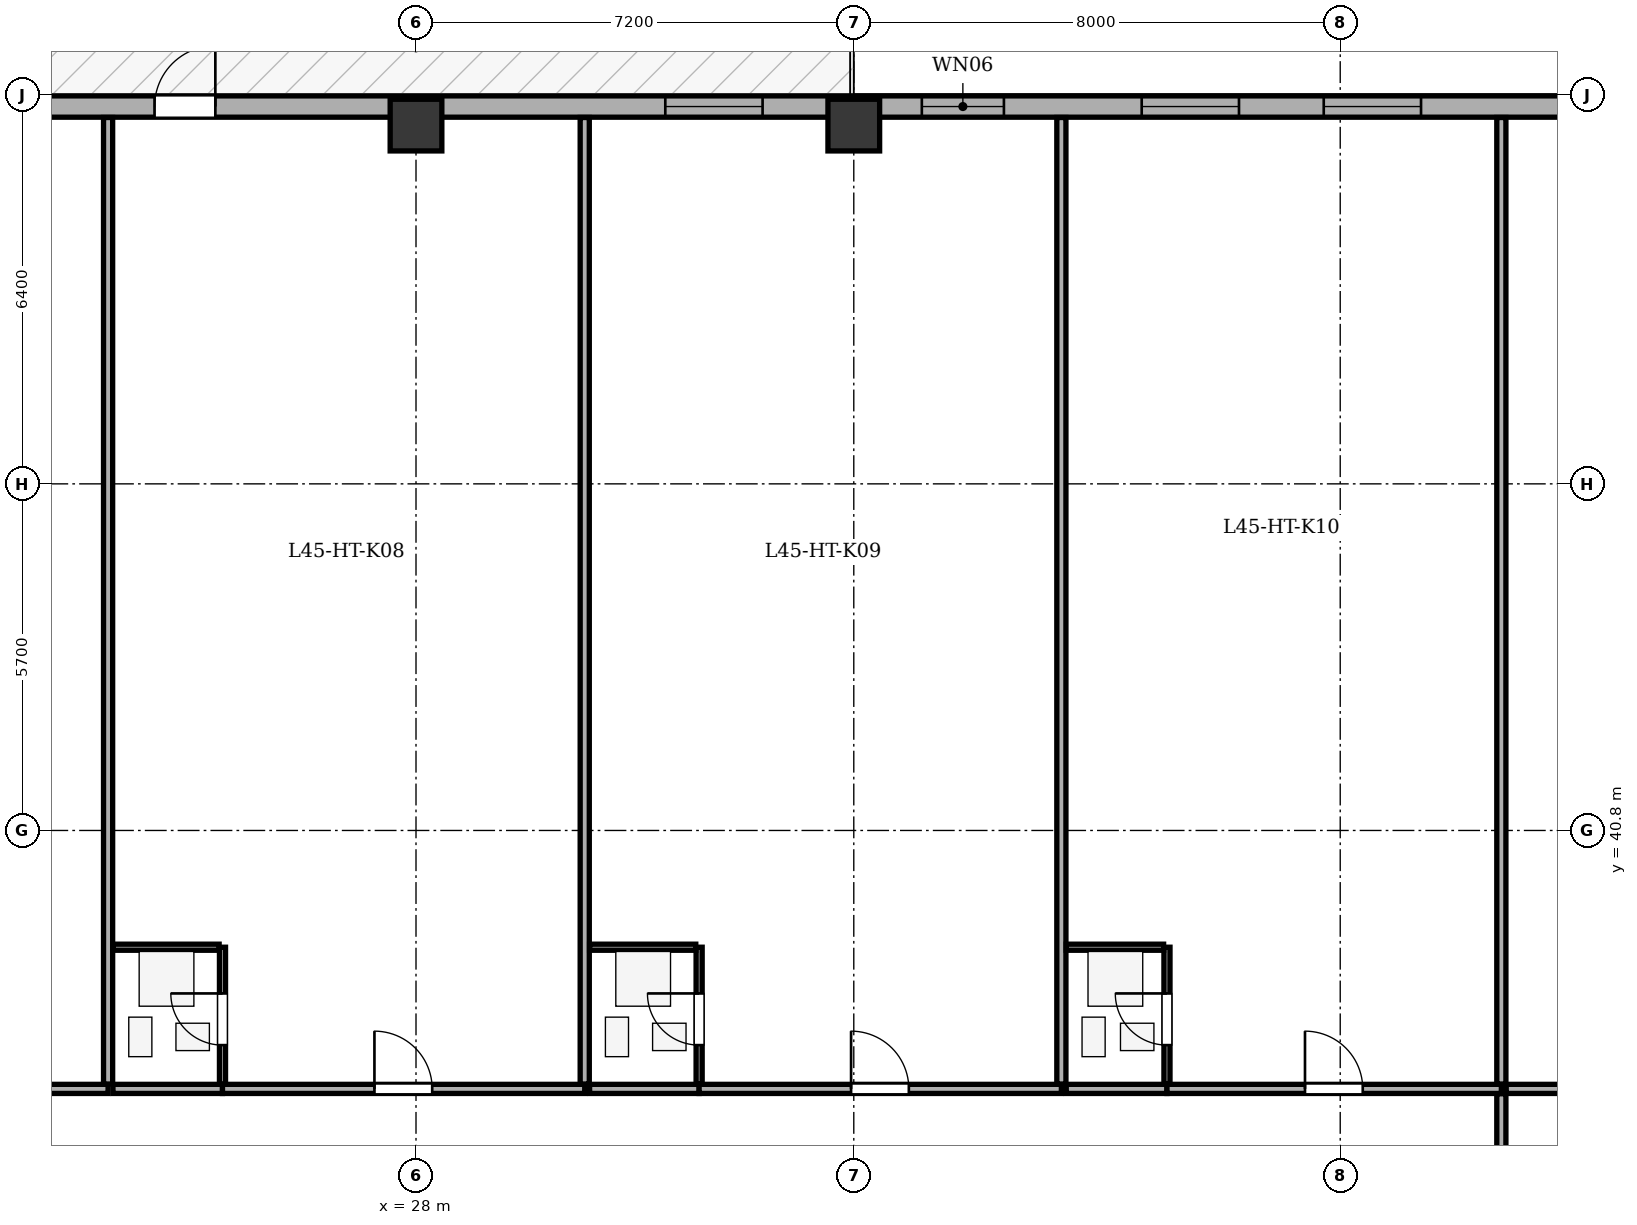
"""IFC4 building model, lengths in metres.
Left out: names, types, materials, properties, quantities, classifications, styles, units other than length and angle.
Written with IfcOpenShell. Run it as: python <this file> out.ifc"""

import sys

from ifc_helpers import new_model, si_unit, direction, frame, frame_2d, origin, origin_2d, place, context, subcontext, project, spatial, rectangle, extrude, element, fill, save


model = new_model("IFC4")
c1 = context("Model", 3, precision=1e-05, world=origin(), true_north=direction((0.0, 1.0)))
c2 = subcontext(c1, "Body", "Model", "MODEL_VIEW")
j1 = project(units=[si_unit("LENGTHUNIT", "METRE"), si_unit("PLANEANGLEUNIT", "RADIAN")], contexts=[c1])
p1 = place(None, origin())
s1 = spatial("IfcSite", under=j1, at=p1, CompositionType="ELEMENT")
p2 = place(p1, origin())
s2 = spatial("IfcBuilding", under=s1, at=p2, CompositionType="ELEMENT")
p3 = place(p2, frame((0.0, 0.0, 176.3)))
s3 = spatial("IfcBuildingStorey", under=s2, at=p3, CompositionType="ELEMENT", Elevation=176.3)
for number, where, z_axis, x_axis in (
    (1, (28.0, 52.4, 0.0), (0.0, 0.0, 1.0), (1.0, 0.0, 0.0)),
    (2, (35.2, 52.4, 0.0), (0.0, 0.0, 1.0), (1.0, 0.0, 0.0)),
):
    element("IfcColumn", number, at=place(p3, frame(where, z_axis=z_axis, x_axis=x_axis)), inside=s3, PredefinedType="COLUMN", context=c2, shape_type="SweptSolid", body=[
        extrude(rectangle(XDim=0.85, YDim=0.85, at=origin_2d()), origin(), (0.0, 0.0, 1.0), 3.5),
    ])
p4 = place(p3, frame((15.7, 52.705, 0.0), z_axis=(0.0, 0.0, 1.0), x_axis=(1.0, 0.0, 0.0)))
e3 = element("IfcWall", 3, at=p4, inside=s3, PredefinedType="STANDARD", context=c2, shape_type="SweptSolid", body=[
    extrude(rectangle(XDim=35.0, YDim=0.35, at=frame_2d((17.5, 0.0))), origin(), (0.0, 0.0, 1.0), 2.785),
])
p5 = place(p4, frame((8.0, 0.0, 0.0)))
e4 = element("IfcOpeningElement", 4, at=p5, cuts=e3, PredefinedType="OPENING", context=c2, shape_type="SweptSolid", body=[
    extrude(rectangle(XDim=1.0, YDim=2.02, at=frame_2d((0.5, 1.01))), frame((0.0, 0.185, 0.0), z_axis=(0.0, -1.0, 0.0), x_axis=(1.0, 0.0, 0.0)), (0.0, 0.0, 1.0), 0.37),
])
p6 = place(p4, frame((1.8, 0.0, 0.75)))
e5 = element("IfcOpeningElement", 5, at=p6, cuts=e3, PredefinedType="OPENING", context=c2, shape_type="SweptSolid", body=[
    extrude(rectangle(XDim=1.6, YDim=1.75, at=frame_2d((0.8, 0.875))), frame((0.0, 0.185, 0.0), z_axis=(0.0, -1.0, 0.0), x_axis=(1.0, 0.0, 0.0)), (0.0, 0.0, 1.0), 0.37),
])
p7 = place(p4, frame((16.4, 0.0, 0.75)))
e6 = element("IfcOpeningElement", 6, at=p7, cuts=e3, PredefinedType="OPENING", context=c2, shape_type="SweptSolid", body=[
    extrude(rectangle(XDim=1.6, YDim=1.75, at=frame_2d((0.8, 0.875))), frame((0.0, 0.185, 0.0), z_axis=(0.0, -1.0, 0.0), x_axis=(1.0, 0.0, 0.0)), (0.0, 0.0, 1.0), 0.37),
])
p8 = place(p4, frame((20.619, 0.0, 0.75)))
e7 = element("IfcOpeningElement", 7, at=p8, cuts=e3, PredefinedType="OPENING", context=c2, shape_type="SweptSolid", body=[
    extrude(rectangle(XDim=1.35, YDim=1.75, at=frame_2d((0.675, 0.875))), frame((0.0, 0.185, 0.0), z_axis=(0.0, -1.0, 0.0), x_axis=(1.0, 0.0, 0.0)), (0.0, 0.0, 1.0), 0.37),
])
p9 = place(p4, frame((24.235, 0.0, 0.75)))
e8 = element("IfcOpeningElement", 8, at=p9, cuts=e3, PredefinedType="OPENING", context=c2, shape_type="SweptSolid", body=[
    extrude(rectangle(XDim=1.6, YDim=1.75, at=frame_2d((0.8, 0.875))), frame((0.0, 0.185, 0.0), z_axis=(0.0, -1.0, 0.0), x_axis=(1.0, 0.0, 0.0)), (0.0, 0.0, 1.0), 0.37),
])
p10 = place(p4, frame((27.229, 0.0, 0.75)))
e9 = element("IfcOpeningElement", 9, at=p10, cuts=e3, PredefinedType="OPENING", context=c2, shape_type="SweptSolid", body=[
    extrude(rectangle(XDim=1.6, YDim=1.75, at=frame_2d((0.8, 0.875))), frame((0.0, 0.185, 0.0), z_axis=(0.0, -1.0, 0.0), x_axis=(1.0, 0.0, 0.0)), (0.0, 0.0, 1.0), 0.37),
])
p11 = place(p4, frame((31.637, 0.0, 0.75)))
e10 = element("IfcOpeningElement", 10, at=p11, cuts=e3, PredefinedType="OPENING", context=c2, shape_type="SweptSolid", body=[
    extrude(rectangle(XDim=1.6, YDim=1.75, at=frame_2d((0.8, 0.875))), frame((0.0, 0.185, 0.0), z_axis=(0.0, -1.0, 0.0), x_axis=(1.0, 0.0, 0.0)), (0.0, 0.0, 1.0), 0.37),
])
p12 = place(p3, frame((17.437, 36.55, 0.0), z_axis=(0.0, 0.0, 1.0), x_axis=(1.0, 0.0, 0.0)))
e11 = element("IfcWall", 11, at=p12, inside=s3, PredefinedType="PARTITIONING", context=c2, shape_type="SweptSolid", body=[
    extrude(rectangle(XDim=5.5, YDim=0.15, at=frame_2d((2.75, 0.0))), origin(), (0.0, 0.0, 1.0), 3.2),
])
p13 = place(p12, frame((2.27, 0.0, 0.0)))
e12 = element("IfcOpeningElement", 12, at=p13, cuts=e11, PredefinedType="OPENING", context=c2, shape_type="SweptSolid", body=[
    extrude(rectangle(XDim=0.95, YDim=2.1, at=frame_2d((0.475, 1.05))), frame((0.0, 0.085, 0.0), z_axis=(0.0, -1.0, 0.0), x_axis=(1.0, 0.0, 0.0)), (0.0, 0.0, 1.0), 0.17),
])
p14 = place(p3, frame((22.936, 36.63, 0.0), z_axis=(0.0, 0.0, 1.0), x_axis=(0.0, 1.0, 0.0)))
e13 = element("IfcWall", 13, at=p14, inside=s3, PredefinedType="PARTITIONING", context=c2, shape_type="SweptSolid", body=[
    extrude(rectangle(XDim=15.895, YDim=0.15, at=frame_2d((7.948, 0.0))), origin(), (0.0, 0.0, 1.0), 3.2),
])
p15 = place(p3, frame((23.016, 36.55, 0.0), z_axis=(0.0, 0.0, 1.0), x_axis=(1.0, 0.0, 0.0)))
e14 = element("IfcWall", 14, at=p15, inside=s3, PredefinedType="PARTITIONING", context=c2, shape_type="SweptSolid", body=[
    extrude(rectangle(XDim=1.801, YDim=0.15, at=frame_2d((0.901, 0.0))), origin(), (0.0, 0.0, 1.0), 3.2),
])
p16 = place(p3, frame((24.817, 36.55, 0.0), z_axis=(0.0, 0.0, 1.0), x_axis=(1.0, 0.0, 0.0)))
e15 = element("IfcWall", 15, at=p16, inside=s3, PredefinedType="PARTITIONING", context=c2, shape_type="SweptSolid", body=[
    extrude(rectangle(XDim=5.958, YDim=0.15, at=frame_2d((2.979, 0.0))), origin(), (0.0, 0.0, 1.0), 3.2),
])
p17 = place(p16, frame((2.499, 0.0, 0.0)))
e16 = element("IfcOpeningElement", 16, at=p17, cuts=e15, PredefinedType="OPENING", context=c2, shape_type="SweptSolid", body=[
    extrude(rectangle(XDim=0.95, YDim=2.1, at=frame_2d((0.475, 1.05))), frame((0.0, 0.085, 0.0), z_axis=(0.0, -1.0, 0.0), x_axis=(1.0, 0.0, 0.0)), (0.0, 0.0, 1.0), 0.17),
])
p18 = place(p3, frame((24.817, 36.63, 0.0), z_axis=(0.0, 0.0, 1.0), x_axis=(0.0, 1.0, 0.0)))
e17 = element("IfcWall", 17, at=p18, inside=s3, PredefinedType="PARTITIONING", context=c2, shape_type="SweptSolid", body=[
    extrude(rectangle(XDim=2.25, YDim=0.1, at=frame_2d((1.125, 0.0))), origin(), (0.0, 0.0, 1.0), 3.2),
])
p19 = place(p18, frame((0.64, 0.0, 0.0)))
e18 = element("IfcOpeningElement", 18, at=p19, cuts=e17, PredefinedType="OPENING", context=c2, shape_type="SweptSolid", body=[
    extrude(rectangle(XDim=0.85, YDim=2.05, at=frame_2d((0.425, 1.025))), frame((0.0, 0.06, 0.0), z_axis=(0.0, -1.0, 0.0), x_axis=(1.0, 0.0, 0.0)), (0.0, 0.0, 1.0), 0.12),
])
p20 = place(p3, frame((23.016, 38.88, 0.0), z_axis=(0.0, 0.0, 1.0), x_axis=(1.0, 0.0, 0.0)))
e19 = element("IfcWall", 19, at=p20, inside=s3, PredefinedType="PARTITIONING", context=c2, shape_type="SweptSolid", body=[
    extrude(rectangle(XDim=1.746, YDim=0.1, at=frame_2d((0.873, 0.0))), origin(), (0.0, 0.0, 1.0), 3.2),
])
p21 = place(p3, frame((30.775, 36.63, 0.0), z_axis=(0.0, 0.0, 1.0), x_axis=(0.0, 1.0, 0.0)))
e20 = element("IfcWall", 20, at=p21, inside=s3, PredefinedType="PARTITIONING", context=c2, shape_type="SweptSolid", body=[
    extrude(rectangle(XDim=15.895, YDim=0.15, at=frame_2d((7.948, 0.0))), origin(), (0.0, 0.0, 1.0), 3.2),
])
p22 = place(p3, frame((30.855, 36.55, 0.0), z_axis=(0.0, 0.0, 1.0), x_axis=(1.0, 0.0, 0.0)))
e21 = element("IfcWall", 21, at=p22, inside=s3, PredefinedType="PARTITIONING", context=c2, shape_type="SweptSolid", body=[
    extrude(rectangle(XDim=1.802, YDim=0.15, at=frame_2d((0.901, 0.0))), origin(), (0.0, 0.0, 1.0), 3.2),
])
p23 = place(p3, frame((32.656, 36.55, 0.0), z_axis=(0.0, 0.0, 1.0), x_axis=(1.0, 0.0, 0.0)))
e22 = element("IfcWall", 22, at=p23, inside=s3, PredefinedType="PARTITIONING", context=c2, shape_type="SweptSolid", body=[
    extrude(rectangle(XDim=5.958, YDim=0.15, at=frame_2d((2.979, 0.0))), origin(), (0.0, 0.0, 1.0), 3.2),
])
p24 = place(p23, frame((2.499, 0.0, 0.0)))
e23 = element("IfcOpeningElement", 23, at=p24, cuts=e22, PredefinedType="OPENING", context=c2, shape_type="SweptSolid", body=[
    extrude(rectangle(XDim=0.95, YDim=2.1, at=frame_2d((0.475, 1.05))), frame((0.0, 0.085, 0.0), z_axis=(0.0, -1.0, 0.0), x_axis=(1.0, 0.0, 0.0)), (0.0, 0.0, 1.0), 0.17),
])
p25 = place(p3, frame((32.656, 36.63, 0.0), z_axis=(0.0, 0.0, 1.0), x_axis=(0.0, 1.0, 0.0)))
e24 = element("IfcWall", 24, at=p25, inside=s3, PredefinedType="PARTITIONING", context=c2, shape_type="SweptSolid", body=[
    extrude(rectangle(XDim=2.25, YDim=0.1, at=frame_2d((1.125, 0.0))), origin(), (0.0, 0.0, 1.0), 3.2),
])
p26 = place(p25, frame((0.64, 0.0, 0.0)))
e25 = element("IfcOpeningElement", 25, at=p26, cuts=e24, PredefinedType="OPENING", context=c2, shape_type="SweptSolid", body=[
    extrude(rectangle(XDim=0.85, YDim=2.05, at=frame_2d((0.425, 1.025))), frame((0.0, 0.06, 0.0), z_axis=(0.0, -1.0, 0.0), x_axis=(1.0, 0.0, 0.0)), (0.0, 0.0, 1.0), 0.12),
])
p27 = place(p3, frame((30.855, 38.88, 0.0), z_axis=(0.0, 0.0, 1.0), x_axis=(1.0, 0.0, 0.0)))
e26 = element("IfcWall", 26, at=p27, inside=s3, PredefinedType="PARTITIONING", context=c2, shape_type="SweptSolid", body=[
    extrude(rectangle(XDim=1.746, YDim=0.1, at=frame_2d((0.873, 0.0))), origin(), (0.0, 0.0, 1.0), 3.2),
])
p28 = place(p3, frame((38.614, 36.63, 0.0), z_axis=(0.0, 0.0, 1.0), x_axis=(0.0, 1.0, 0.0)))
e27 = element("IfcWall", 27, at=p28, inside=s3, PredefinedType="PARTITIONING", context=c2, shape_type="SweptSolid", body=[
    extrude(rectangle(XDim=15.895, YDim=0.15, at=frame_2d((7.948, 0.0))), origin(), (0.0, 0.0, 1.0), 3.2),
])
p29 = place(p3, frame((38.694, 36.55, 0.0), z_axis=(0.0, 0.0, 1.0), x_axis=(1.0, 0.0, 0.0)))
e28 = element("IfcWall", 28, at=p29, inside=s3, PredefinedType="PARTITIONING", context=c2, shape_type="SweptSolid", body=[
    extrude(rectangle(XDim=1.656, YDim=0.15, at=frame_2d((0.828, 0.0))), origin(), (0.0, 0.0, 1.0), 3.2),
])
p30 = place(p3, frame((40.351, 36.55, 0.0), z_axis=(0.0, 0.0, 1.0), x_axis=(1.0, 0.0, 0.0)))
e29 = element("IfcWall", 29, at=p30, inside=s3, PredefinedType="PARTITIONING", context=c2, shape_type="SweptSolid", body=[
    extrude(rectangle(XDim=5.5, YDim=0.15, at=frame_2d((2.75, 0.0))), origin(), (0.0, 0.0, 1.0), 3.2),
])
p31 = place(p30, frame((2.27, 0.0, 0.0)))
e30 = element("IfcOpeningElement", 30, at=p31, cuts=e29, PredefinedType="OPENING", context=c2, shape_type="SweptSolid", body=[
    extrude(rectangle(XDim=0.95, YDim=2.1, at=frame_2d((0.475, 1.05))), frame((0.0, 0.085, 0.0), z_axis=(0.0, -1.0, 0.0), x_axis=(1.0, 0.0, 0.0)), (0.0, 0.0, 1.0), 0.17),
])
p32 = place(p3, frame((40.351, 36.63, 0.0), z_axis=(0.0, 0.0, 1.0), x_axis=(0.0, 1.0, 0.0)))
e31 = element("IfcWall", 31, at=p32, inside=s3, PredefinedType="PARTITIONING", context=c2, shape_type="SweptSolid", body=[
    extrude(rectangle(XDim=2.25, YDim=0.1, at=frame_2d((1.125, 0.0))), origin(), (0.0, 0.0, 1.0), 3.2),
])
p33 = place(p32, frame((0.64, 0.0, 0.0)))
e32 = element("IfcOpeningElement", 32, at=p33, cuts=e31, PredefinedType="OPENING", context=c2, shape_type="SweptSolid", body=[
    extrude(rectangle(XDim=0.85, YDim=2.05, at=frame_2d((0.425, 1.025))), frame((0.0, 0.06, 0.0), z_axis=(0.0, -1.0, 0.0), x_axis=(1.0, 0.0, 0.0)), (0.0, 0.0, 1.0), 0.12),
])
p34 = place(p3, frame((38.694, 38.88, 0.0), z_axis=(0.0, 0.0, 1.0), x_axis=(1.0, 0.0, 0.0)))
e33 = element("IfcWall", 33, at=p34, inside=s3, PredefinedType="PARTITIONING", context=c2, shape_type="SweptSolid", body=[
    extrude(rectangle(XDim=1.602, YDim=0.1, at=frame_2d((0.801, 0.0))), origin(), (0.0, 0.0, 1.0), 3.2),
])
p35 = place(p3, frame((45.85, 36.63, 0.0), z_axis=(0.0, 0.0, 1.0), x_axis=(0.0, 1.0, 0.0)))
e34 = element("IfcWall", 34, at=p35, inside=s3, PredefinedType="PARTITIONING", context=c2, shape_type="SweptSolid", body=[
    extrude(rectangle(XDim=15.895, YDim=0.15, at=frame_2d((7.948, 0.0))), origin(), (0.0, 0.0, 1.0), 3.2),
])
p36 = place(p3, frame((45.93, 36.55, 0.0), z_axis=(0.0, 0.0, 1.0), x_axis=(1.0, 0.0, 0.0)))
e35 = element("IfcWall", 35, at=p36, inside=s3, PredefinedType="PARTITIONING", context=c2, shape_type="SweptSolid", body=[
    extrude(rectangle(XDim=9.395, YDim=0.15, at=frame_2d((4.698, 0.0))), origin(), (0.0, 0.0, 1.0), 3.2),
])
p37 = place(p3, frame((45.85, 30.08, 0.0), z_axis=(0.0, 0.0, 1.0), x_axis=(0.0, 1.0, 0.0)))
e36 = element("IfcWall", 36, at=p37, inside=s3, PredefinedType="PARTITIONING", context=c2, shape_type="SweptSolid", body=[
    extrude(rectangle(XDim=6.39, YDim=0.15, at=frame_2d((3.195, 0.0))), origin(), (0.0, 0.0, 1.0), 3.2),
])
p38 = place(p37, frame((2.715, 0.0, 0.0)))
e37 = element("IfcOpeningElement", 37, at=p38, cuts=e36, PredefinedType="OPENING", context=c2, shape_type="SweptSolid", body=[
    extrude(rectangle(XDim=0.95, YDim=2.1, at=frame_2d((0.475, 1.05))), frame((0.0, 0.085, 0.0), z_axis=(0.0, -1.0, 0.0), x_axis=(1.0, 0.0, 0.0)), (0.0, 0.0, 1.0), 0.17),
])
p39 = place(p5, origin())
e38 = element("IfcDoor", 38, at=p39, inside=s3, OperationType="SINGLE_SWING_RIGHT", PredefinedType="DOOR", context=c2, shape_type="SweptSolid", body=[
    extrude(rectangle(XDim=1.0, YDim=2.02, at=frame_2d((0.5, 1.01))), frame((0.0, 0.025, 0.0), z_axis=(0.0, -1.0, 0.0), x_axis=(1.0, 0.0, 0.0)), (0.0, 0.0, 1.0), 0.05),
])
fill(e4, e38)
p40 = place(p7, origin())
e39 = element("IfcWindow", 39, at=p40, inside=s3, PartitioningType="SINGLE_PANEL", PredefinedType="WINDOW", context=c2, shape_type="SweptSolid", body=[
    extrude(rectangle(XDim=1.6, YDim=1.75, at=frame_2d((0.8, 0.875))), frame((0.0, -0.01, 0.0), z_axis=(0.0, -1.0, 0.0), x_axis=(1.0, 0.0, 0.0)), (0.0, 0.0, 1.0), 0.06),
])
fill(e6, e39)
p41 = place(p8, origin())
e40 = element("IfcWindow", 40, at=p41, inside=s3, PartitioningType="SINGLE_PANEL", PredefinedType="WINDOW", context=c2, shape_type="SweptSolid", body=[
    extrude(rectangle(XDim=1.35, YDim=1.75, at=frame_2d((0.675, 0.875))), frame((0.0, -0.01, 0.0), z_axis=(0.0, -1.0, 0.0), x_axis=(1.0, 0.0, 0.0)), (0.0, 0.0, 1.0), 0.06),
])
fill(e7, e40)
p42 = place(p9, origin())
e41 = element("IfcWindow", 41, at=p42, inside=s3, PartitioningType="SINGLE_PANEL", PredefinedType="WINDOW", context=c2, shape_type="SweptSolid", body=[
    extrude(rectangle(XDim=1.6, YDim=1.75, at=frame_2d((0.8, 0.875))), frame((0.0, -0.01, 0.0), z_axis=(0.0, -1.0, 0.0), x_axis=(1.0, 0.0, 0.0)), (0.0, 0.0, 1.0), 0.06),
])
fill(e8, e41)
p43 = place(p10, origin())
e42 = element("IfcWindow", 42, at=p43, inside=s3, PartitioningType="SINGLE_PANEL", PredefinedType="WINDOW", context=c2, shape_type="SweptSolid", body=[
    extrude(rectangle(XDim=1.6, YDim=1.75, at=frame_2d((0.8, 0.875))), frame((0.0, -0.01, 0.0), z_axis=(0.0, -1.0, 0.0), x_axis=(1.0, 0.0, 0.0)), (0.0, 0.0, 1.0), 0.06),
])
fill(e9, e42)
p44 = place(p19, origin())
e43 = element("IfcDoor", 43, at=p44, inside=s3, OperationType="SINGLE_SWING_RIGHT", PredefinedType="DOOR", context=c2, shape_type="SweptSolid", body=[
    extrude(rectangle(XDim=0.85, YDim=2.05, at=frame_2d((0.425, 1.025))), frame((0.0, 0.025, 0.0), z_axis=(0.0, -1.0, 0.0), x_axis=(1.0, 0.0, 0.0)), (0.0, 0.0, 1.0), 0.05),
])
fill(e18, e43)
p45 = place(p17, origin())
e44 = element("IfcDoor", 44, at=p45, inside=s3, OperationType="SINGLE_SWING_LEFT", PredefinedType="DOOR", context=c2, shape_type="SweptSolid", body=[
    extrude(rectangle(XDim=0.95, YDim=2.1, at=frame_2d((0.475, 1.05))), frame((0.0, 0.025, 0.0), z_axis=(0.0, -1.0, 0.0), x_axis=(1.0, 0.0, 0.0)), (0.0, 0.0, 1.0), 0.05),
])
fill(e16, e44)
p46 = place(p26, origin())
e45 = element("IfcDoor", 45, at=p46, inside=s3, OperationType="SINGLE_SWING_RIGHT", PredefinedType="DOOR", context=c2, shape_type="SweptSolid", body=[
    extrude(rectangle(XDim=0.85, YDim=2.05, at=frame_2d((0.425, 1.025))), frame((0.0, 0.025, 0.0), z_axis=(0.0, -1.0, 0.0), x_axis=(1.0, 0.0, 0.0)), (0.0, 0.0, 1.0), 0.05),
])
fill(e25, e45)
p47 = place(p24, origin())
e46 = element("IfcDoor", 46, at=p47, inside=s3, OperationType="SINGLE_SWING_LEFT", PredefinedType="DOOR", context=c2, shape_type="SweptSolid", body=[
    extrude(rectangle(XDim=0.95, YDim=2.1, at=frame_2d((0.475, 1.05))), frame((0.0, 0.025, 0.0), z_axis=(0.0, -1.0, 0.0), x_axis=(1.0, 0.0, 0.0)), (0.0, 0.0, 1.0), 0.05),
])
fill(e23, e46)
p48 = place(p33, origin())
e47 = element("IfcDoor", 47, at=p48, inside=s3, OperationType="SINGLE_SWING_RIGHT", PredefinedType="DOOR", context=c2, shape_type="SweptSolid", body=[
    extrude(rectangle(XDim=0.85, YDim=2.05, at=frame_2d((0.425, 1.025))), frame((0.0, 0.025, 0.0), z_axis=(0.0, -1.0, 0.0), x_axis=(1.0, 0.0, 0.0)), (0.0, 0.0, 1.0), 0.05),
])
fill(e32, e47)
p49 = place(p31, origin())
e48 = element("IfcDoor", 48, at=p49, inside=s3, OperationType="SINGLE_SWING_LEFT", PredefinedType="DOOR", context=c2, shape_type="SweptSolid", body=[
    extrude(rectangle(XDim=0.95, YDim=2.1, at=frame_2d((0.475, 1.05))), frame((0.0, 0.025, 0.0), z_axis=(0.0, -1.0, 0.0), x_axis=(1.0, 0.0, 0.0)), (0.0, 0.0, 1.0), 0.05),
])
fill(e30, e48)
save(model, sys.argv[1])
